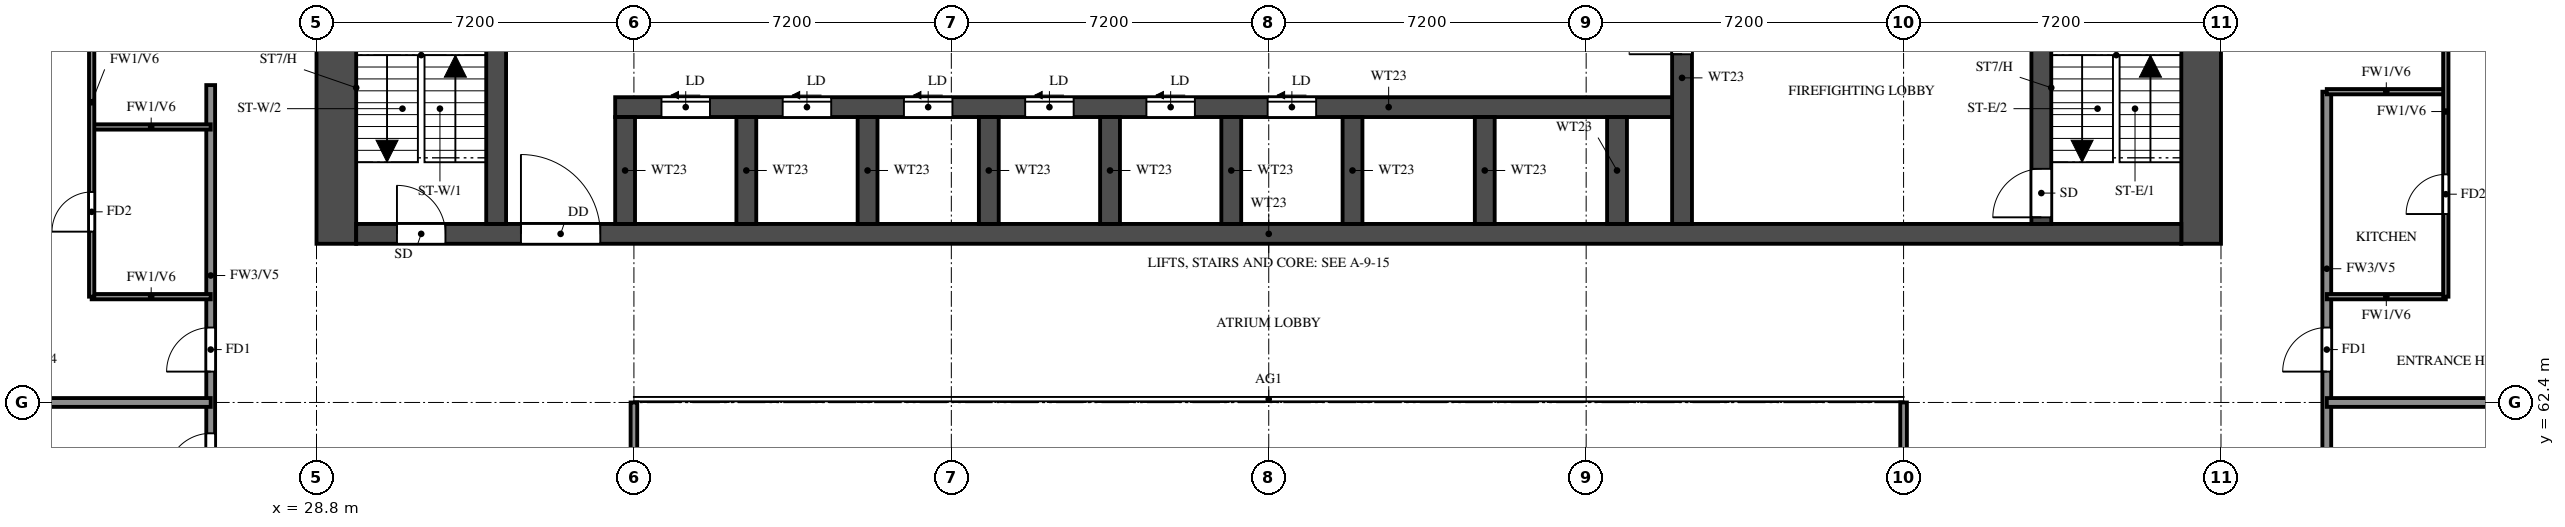
"""IFC4 building model, lengths in metres.
Left out: names, types, materials, properties, quantities, classifications, styles, units other than length and angle.
Written with IfcOpenShell. Run it as: python <this file> out.ifc"""

import sys

from ifc_helpers import new_model, si_unit, direction, frame, frame_2d, origin, place, context, subcontext, project, spatial, rectangle, extrude, element, fill, save


model = new_model("IFC4")
c1 = context("Model", 3, precision=1e-05, world=origin(), true_north=direction((0.0, 1.0)))
c2 = subcontext(c1, "Body", "Model", "MODEL_VIEW")
j1 = project(units=[si_unit("LENGTHUNIT", "METRE"), si_unit("PLANEANGLEUNIT", "RADIAN")], contexts=[c1])
p1 = place(None, origin())
s1 = spatial("IfcSite", under=j1, at=p1, CompositionType="ELEMENT")
p2 = place(p1, origin())
s2 = spatial("IfcBuilding", under=s1, at=p2, CompositionType="ELEMENT")
p3 = place(p2, frame((0.0, 0.0, 104.0)))
s3 = spatial("IfcBuildingStorey", under=s2, at=p3, CompositionType="ELEMENT", Elevation=104.0)
for number, where, z_axis, x_axis in (
    (1, (29.25, 66.0, 0.0), (0.0, 0.0, 1.0), (0.0, 1.0, 0.0)),
    (2, (71.55, 66.0, 0.0), (0.0, 0.0, 1.0), (0.0, 1.0, 0.0)),
):
    element("IfcWall", number, at=place(p3, frame(where, z_axis=z_axis, x_axis=x_axis)), inside=s3, PredefinedType="SHEAR", context=c2, shape_type="SweptSolid", body=[
        extrude(rectangle(XDim=12.0, YDim=0.9, at=frame_2d((6.0, 0.0))), origin(), (0.0, 0.0, 1.0), 3.1),
    ])
p4 = place(p3, frame((29.7, 66.225, 0.0), z_axis=(0.0, 0.0, 1.0), x_axis=(1.0, 0.0, 0.0)))
e3 = element("IfcWall", 3, at=p4, inside=s3, PredefinedType="SHEAR", context=c2, shape_type="SweptSolid", body=[
    extrude(rectangle(XDim=41.4, YDim=0.45, at=frame_2d((20.7, 0.0))), origin(), (0.0, 0.0, 1.0), 3.1),
])
p5 = place(p4, frame((0.925, 0.0, 0.0)))
e4 = element("IfcOpeningElement", 4, at=p5, cuts=e3, PredefinedType="OPENING", context=c2, shape_type="SweptSolid", body=[
    extrude(rectangle(XDim=1.1, YDim=2.1, at=frame_2d((0.55, 1.05))), frame((0.0, 0.235, 0.0), z_axis=(0.0, -1.0, 0.0), x_axis=(1.0, 0.0, 0.0)), (0.0, 0.0, 1.0), 0.47),
])
p6 = place(p4, frame((3.738, 0.0, 0.0)))
e5 = element("IfcOpeningElement", 5, at=p6, cuts=e3, PredefinedType="OPENING", context=c2, shape_type="SweptSolid", body=[
    extrude(rectangle(XDim=1.8, YDim=2.1, at=frame_2d((0.9, 1.05))), frame((0.0, 0.235, 0.0), z_axis=(0.0, -1.0, 0.0), x_axis=(1.0, 0.0, 0.0)), (0.0, 0.0, 1.0), 0.47),
])
p7 = place(p3, frame((35.575, 69.1, 0.0), z_axis=(0.0, 0.0, 1.0), x_axis=(1.0, 0.0, 0.0)))
e6 = element("IfcWall", 6, at=p7, inside=s3, PredefinedType="SHEAR", context=c2, shape_type="SweptSolid", body=[
    extrude(rectangle(XDim=24.2, YDim=0.45, at=frame_2d((12.1, 0.0))), origin(), (0.0, 0.0, 1.0), 3.1),
])
p8 = place(p7, frame((1.05, 0.0, 0.0)))
e7 = element("IfcOpeningElement", 7, at=p8, cuts=e6, PredefinedType="OPENING", context=c2, shape_type="SweptSolid", body=[
    extrude(rectangle(XDim=1.1, YDim=2.1, at=frame_2d((0.55, 1.05))), frame((0.0, 0.235, 0.0), z_axis=(0.0, -1.0, 0.0), x_axis=(1.0, 0.0, 0.0)), (0.0, 0.0, 1.0), 0.47),
])
p9 = place(p7, frame((3.8, 0.0, 0.0)))
e8 = element("IfcOpeningElement", 8, at=p9, cuts=e6, PredefinedType="OPENING", context=c2, shape_type="SweptSolid", body=[
    extrude(rectangle(XDim=1.1, YDim=2.1, at=frame_2d((0.55, 1.05))), frame((0.0, 0.235, 0.0), z_axis=(0.0, -1.0, 0.0), x_axis=(1.0, 0.0, 0.0)), (0.0, 0.0, 1.0), 0.47),
])
p10 = place(p7, frame((6.55, 0.0, 0.0)))
e9 = element("IfcOpeningElement", 9, at=p10, cuts=e6, PredefinedType="OPENING", context=c2, shape_type="SweptSolid", body=[
    extrude(rectangle(XDim=1.1, YDim=2.1, at=frame_2d((0.55, 1.05))), frame((0.0, 0.235, 0.0), z_axis=(0.0, -1.0, 0.0), x_axis=(1.0, 0.0, 0.0)), (0.0, 0.0, 1.0), 0.47),
])
p11 = place(p7, frame((9.3, 0.0, 0.0)))
e10 = element("IfcOpeningElement", 10, at=p11, cuts=e6, PredefinedType="OPENING", context=c2, shape_type="SweptSolid", body=[
    extrude(rectangle(XDim=1.1, YDim=2.1, at=frame_2d((0.55, 1.05))), frame((0.0, 0.235, 0.0), z_axis=(0.0, -1.0, 0.0), x_axis=(1.0, 0.0, 0.0)), (0.0, 0.0, 1.0), 0.47),
])
p12 = place(p7, frame((12.05, 0.0, 0.0)))
e11 = element("IfcOpeningElement", 11, at=p12, cuts=e6, PredefinedType="OPENING", context=c2, shape_type="SweptSolid", body=[
    extrude(rectangle(XDim=1.1, YDim=2.1, at=frame_2d((0.55, 1.05))), frame((0.0, 0.235, 0.0), z_axis=(0.0, -1.0, 0.0), x_axis=(1.0, 0.0, 0.0)), (0.0, 0.0, 1.0), 0.47),
])
p13 = place(p7, frame((14.8, 0.0, 0.0)))
e12 = element("IfcOpeningElement", 12, at=p13, cuts=e6, PredefinedType="OPENING", context=c2, shape_type="SweptSolid", body=[
    extrude(rectangle(XDim=1.1, YDim=2.1, at=frame_2d((0.55, 1.05))), frame((0.0, 0.235, 0.0), z_axis=(0.0, -1.0, 0.0), x_axis=(1.0, 0.0, 0.0)), (0.0, 0.0, 1.0), 0.47),
])
p14 = place(p3, frame((32.875, 66.45, 0.0), z_axis=(0.0, 0.0, 1.0), x_axis=(0.0, 1.0, 0.0)))
e13 = element("IfcWall", 13, at=p14, inside=s3, PredefinedType="SHEAR", context=c2, shape_type="SweptSolid", body=[
    extrude(rectangle(XDim=10.65, YDim=0.45, at=frame_2d((5.325, 0.0))), origin(), (0.0, 0.0, 1.0), 3.1),
])
p15 = place(p3, frame((67.925, 66.45, 0.0), z_axis=(0.0, 0.0, 1.0), x_axis=(0.0, 1.0, 0.0)))
e14 = element("IfcWall", 14, at=p15, inside=s3, PredefinedType="SHEAR", context=c2, shape_type="SweptSolid", body=[
    extrude(rectangle(XDim=10.65, YDim=0.45, at=frame_2d((5.325, 0.0))), origin(), (0.0, 0.0, 1.0), 3.1),
])
p16 = place(p15, frame((0.15, 0.0, 0.0)))
e15 = element("IfcOpeningElement", 15, at=p16, cuts=e14, PredefinedType="OPENING", context=c2, shape_type="SweptSolid", body=[
    extrude(rectangle(XDim=1.1, YDim=2.1, at=frame_2d((0.55, 1.05))), frame((0.0, 0.235, 0.0), z_axis=(0.0, -1.0, 0.0), x_axis=(1.0, 0.0, 0.0)), (0.0, 0.0, 1.0), 0.47),
])
p17 = place(p3, frame((59.775, 66.45, 0.0), z_axis=(0.0, 0.0, 1.0), x_axis=(0.0, 1.0, 0.0)))
e16 = element("IfcWall", 16, at=p17, inside=s3, PredefinedType="SHEAR", context=c2, shape_type="SweptSolid", body=[
    extrude(rectangle(XDim=6.025, YDim=0.45, at=frame_2d((3.013, 0.0))), origin(), (0.0, 0.0, 1.0), 3.1),
])
p18 = place(p17, frame((3.85, 0.0, 0.0)))
e17 = element("IfcOpeningElement", 17, at=p18, cuts=e16, PredefinedType="OPENING", context=c2, shape_type="SweptSolid", body=[
    extrude(rectangle(XDim=1.2, YDim=2.1, at=frame_2d((0.6, 1.05))), frame((0.0, 0.235, 0.0), z_axis=(0.0, -1.0, 0.0), x_axis=(1.0, 0.0, 0.0)), (0.0, 0.0, 1.0), 0.47),
])
for number, where, z_axis, x_axis in (
    (18, (35.8, 66.45, 0.0), (0.0, 0.0, 1.0), (0.0, 1.0, 0.0)),
    (19, (38.55, 66.45, 0.0), (0.0, 0.0, 1.0), (0.0, 1.0, 0.0)),
    (20, (41.3, 66.45, 0.0), (0.0, 0.0, 1.0), (0.0, 1.0, 0.0)),
    (21, (44.05, 66.45, 0.0), (0.0, 0.0, 1.0), (0.0, 1.0, 0.0)),
    (22, (46.8, 66.45, 0.0), (0.0, 0.0, 1.0), (0.0, 1.0, 0.0)),
    (23, (49.55, 66.45, 0.0), (0.0, 0.0, 1.0), (0.0, 1.0, 0.0)),
    (24, (52.3, 66.45, 0.0), (0.0, 0.0, 1.0), (0.0, 1.0, 0.0)),
    (25, (55.3, 66.45, 0.0), (0.0, 0.0, 1.0), (0.0, 1.0, 0.0)),
    (26, (58.3, 66.45, 0.0), (0.0, 0.0, 1.0), (0.0, 1.0, 0.0)),
):
    element("IfcWall", number, at=place(p3, frame(where, z_axis=z_axis, x_axis=x_axis)), inside=s3, PredefinedType="SHEAR", context=c2, shape_type="SweptSolid", body=[
        extrude(rectangle(XDim=2.425, YDim=0.45, at=frame_2d((1.212, 0.0))), origin(), (0.0, 0.0, 1.0), 3.1),
    ])
p19 = place(p3, frame((26.4, 60.0, 0.0), z_axis=(0.0, 0.0, 1.0), x_axis=(0.0, 1.0, 0.0)))
e27 = element("IfcWall", 27, at=p19, inside=s3, PredefinedType="SOLIDWALL", context=c2, shape_type="SweptSolid", body=[
    extrude(rectangle(XDim=9.6, YDim=0.2, at=frame_2d((4.8, 0.0))), origin(), (0.0, 0.0, 1.0), 3.1),
])
p20 = place(p19, frame((0.7, 0.0, 0.0)))
e28 = element("IfcOpeningElement", 28, at=p20, cuts=e27, PredefinedType="OPENING", context=c2, shape_type="SweptSolid", body=[
    extrude(rectangle(XDim=1.0, YDim=2.1, at=frame_2d((0.5, 1.05))), frame((0.0, 0.11, 0.0), z_axis=(0.0, -1.0, 0.0), x_axis=(1.0, 0.0, 0.0)), (0.0, 0.0, 1.0), 0.22),
])
p21 = place(p19, frame((3.1, 0.0, 0.0)))
e29 = element("IfcOpeningElement", 29, at=p21, cuts=e27, PredefinedType="OPENING", context=c2, shape_type="SweptSolid", body=[
    extrude(rectangle(XDim=1.0, YDim=2.1, at=frame_2d((0.5, 1.05))), frame((0.0, 0.11, 0.0), z_axis=(0.0, -1.0, 0.0), x_axis=(1.0, 0.0, 0.0)), (0.0, 0.0, 1.0), 0.22),
])
p22 = place(p3, frame((74.4, 60.0, 0.0), z_axis=(0.0, 0.0, 1.0), x_axis=(0.0, 1.0, 0.0)))
e30 = element("IfcWall", 30, at=p22, inside=s3, PredefinedType="SOLIDWALL", context=c2, shape_type="SweptSolid", body=[
    extrude(rectangle(XDim=9.45, YDim=0.2, at=frame_2d((4.725, 0.0))), origin(), (0.0, 0.0, 1.0), 3.1),
])
p23 = place(p22, frame((3.1, 0.0, 0.0)))
e31 = element("IfcOpeningElement", 31, at=p23, cuts=e30, PredefinedType="OPENING", context=c2, shape_type="SweptSolid", body=[
    extrude(rectangle(XDim=1.0, YDim=2.1, at=frame_2d((0.5, 1.05))), frame((0.0, 0.11, 0.0), z_axis=(0.0, -1.0, 0.0), x_axis=(1.0, 0.0, 0.0)), (0.0, 0.0, 1.0), 0.22),
])
for number, where, z_axis, x_axis in (
    (32, (14.525, 62.4, 0.0), (0.0, 0.0, 1.0), (1.0, 0.0, 0.0)),
    (33, (74.4, 62.4, 0.0), (0.0, 0.0, 1.0), (1.0, 0.0, 0.0)),
):
    element("IfcWall", number, at=place(p3, frame(where, z_axis=z_axis, x_axis=x_axis)), inside=s3, PredefinedType="SOLIDWALL", context=c2, shape_type="SweptSolid", body=[
        extrude(rectangle(XDim=11.875, YDim=0.2, at=frame_2d((5.938, 0.0))), origin(), (0.0, 0.0, 1.0), 3.1),
    ])
p24 = place(p3, frame((23.7, 64.8, 0.0), z_axis=(0.0, 0.0, 1.0), x_axis=(1.0, 0.0, 0.0)))
e34 = element("IfcWall", 34, at=p24, inside=s3, PredefinedType="PARTITIONING", context=c2, shape_type="SweptSolid", body=[
    extrude(rectangle(XDim=2.7, YDim=0.12, at=frame_2d((1.35, 0.0))), origin(), (0.0, 0.0, 1.0), 3.1),
])
p25 = place(p3, frame((74.4, 64.8, 0.0), z_axis=(0.0, 0.0, 1.0), x_axis=(1.0, 0.0, 0.0)))
e35 = element("IfcWall", 35, at=p25, inside=s3, PredefinedType="PARTITIONING", context=c2, shape_type="SweptSolid", body=[
    extrude(rectangle(XDim=2.7, YDim=0.12, at=frame_2d((1.35, 0.0))), origin(), (0.0, 0.0, 1.0), 3.1),
])
p26 = place(p3, frame((23.7, 68.65, 0.0), z_axis=(0.0, 0.0, 1.0), x_axis=(1.0, 0.0, 0.0)))
e36 = element("IfcWall", 36, at=p26, inside=s3, PredefinedType="PARTITIONING", context=c2, shape_type="SweptSolid", body=[
    extrude(rectangle(XDim=2.7, YDim=0.12, at=frame_2d((1.35, 0.0))), origin(), (0.0, 0.0, 1.0), 3.1),
])
p27 = place(p3, frame((74.4, 69.45, 0.0), z_axis=(0.0, 0.0, 1.0), x_axis=(1.0, 0.0, 0.0)))
e37 = element("IfcWall", 37, at=p27, inside=s3, PredefinedType="PARTITIONING", context=c2, shape_type="SweptSolid", body=[
    extrude(rectangle(XDim=2.7, YDim=0.12, at=frame_2d((1.35, 0.0))), origin(), (0.0, 0.0, 1.0), 3.1),
])
p28 = place(p3, frame((23.7, 64.8, 0.0), z_axis=(0.0, 0.0, 1.0), x_axis=(0.0, 1.0, 0.0)))
e38 = element("IfcWall", 38, at=p28, inside=s3, PredefinedType="PARTITIONING", context=c2, shape_type="SweptSolid", body=[
    extrude(rectangle(XDim=8.4, YDim=0.12, at=frame_2d((4.2, 0.0))), origin(), (0.0, 0.0, 1.0), 3.1),
])
p29 = place(p28, frame((1.475, 0.0, 0.0)))
e39 = element("IfcOpeningElement", 39, at=p29, cuts=e38, PredefinedType="OPENING", context=c2, shape_type="SweptSolid", body=[
    extrude(rectangle(XDim=0.9, YDim=2.1, at=frame_2d((0.45, 1.05))), frame((0.0, 0.07, 0.0), z_axis=(0.0, -1.0, 0.0), x_axis=(1.0, 0.0, 0.0)), (0.0, 0.0, 1.0), 0.14),
])
p30 = place(p28, frame((5.675, 0.0, 0.0)))
e40 = element("IfcOpeningElement", 40, at=p30, cuts=e38, PredefinedType="OPENING", context=c2, shape_type="SweptSolid", body=[
    extrude(rectangle(XDim=0.9, YDim=2.1, at=frame_2d((0.45, 1.05))), frame((0.0, 0.07, 0.0), z_axis=(0.0, -1.0, 0.0), x_axis=(1.0, 0.0, 0.0)), (0.0, 0.0, 1.0), 0.14),
])
p31 = place(p3, frame((77.1, 64.8, 0.0), z_axis=(0.0, 0.0, 1.0), x_axis=(0.0, 1.0, 0.0)))
e41 = element("IfcWall", 41, at=p31, inside=s3, PredefinedType="PARTITIONING", context=c2, shape_type="SweptSolid", body=[
    extrude(rectangle(XDim=8.4, YDim=0.12, at=frame_2d((4.2, 0.0))), origin(), (0.0, 0.0, 1.0), 3.1),
])
p32 = place(p31, frame((1.875, 0.0, 0.0)))
e42 = element("IfcOpeningElement", 42, at=p32, cuts=e41, PredefinedType="OPENING", context=c2, shape_type="SweptSolid", body=[
    extrude(rectangle(XDim=0.9, YDim=2.1, at=frame_2d((0.45, 1.05))), frame((0.0, 0.07, 0.0), z_axis=(0.0, -1.0, 0.0), x_axis=(1.0, 0.0, 0.0)), (0.0, 0.0, 1.0), 0.14),
])
p33 = place(p31, frame((6.075, 0.0, 0.0)))
e43 = element("IfcOpeningElement", 43, at=p33, cuts=e41, PredefinedType="OPENING", context=c2, shape_type="SweptSolid", body=[
    extrude(rectangle(XDim=0.9, YDim=2.1, at=frame_2d((0.45, 1.05))), frame((0.0, 0.07, 0.0), z_axis=(0.0, -1.0, 0.0), x_axis=(1.0, 0.0, 0.0)), (0.0, 0.0, 1.0), 0.14),
])
for number, where, z_axis, x_axis in (
    (44, (36.0, 48.0, 0.0), (0.0, 0.0, 1.0), (0.0, 1.0, 0.0)),
    (45, (64.8, 48.0, 0.0), (0.0, 0.0, 1.0), (0.0, 1.0, 0.0)),
):
    element("IfcWall", number, at=place(p3, frame(where, z_axis=z_axis, x_axis=x_axis)), inside=s3, PredefinedType="SOLIDWALL", context=c2, shape_type="SweptSolid", body=[
        extrude(rectangle(XDim=14.4, YDim=0.15, at=frame_2d((7.2, 0.0))), origin(), (0.0, 0.0, 1.0), 2.2),
    ])
p34 = place(p5, origin())
e46 = element("IfcDoor", 46, at=p34, inside=s3, OperationType="SINGLE_SWING_LEFT", PredefinedType="DOOR", context=c2, shape_type="SweptSolid", body=[
    extrude(rectangle(XDim=1.1, YDim=2.1, at=frame_2d((0.55, 1.05))), frame((0.0, 0.025, 0.0), z_axis=(0.0, -1.0, 0.0), x_axis=(1.0, 0.0, 0.0)), (0.0, 0.0, 1.0), 0.05),
])
fill(e4, e46)
p35 = place(p16, origin())
e47 = element("IfcDoor", 47, at=p35, inside=s3, OperationType="SINGLE_SWING_LEFT", PredefinedType="DOOR", context=c2, shape_type="SweptSolid", body=[
    extrude(rectangle(XDim=1.1, YDim=2.1, at=frame_2d((0.55, 1.05))), frame((0.0, 0.025, 0.0), z_axis=(0.0, -1.0, 0.0), x_axis=(1.0, 0.0, 0.0)), (0.0, 0.0, 1.0), 0.05),
])
fill(e15, e47)
p36 = place(p6, origin())
e48 = element("IfcDoor", 48, at=p36, inside=s3, OperationType="DOUBLE_DOOR_SINGLE_SWING", PredefinedType="DOOR", context=c2, shape_type="SweptSolid", body=[
    extrude(rectangle(XDim=1.8, YDim=2.1, at=frame_2d((0.9, 1.05))), frame((0.0, 0.025, 0.0), z_axis=(0.0, -1.0, 0.0), x_axis=(1.0, 0.0, 0.0)), (0.0, 0.0, 1.0), 0.05),
])
fill(e5, e48)
p37 = place(p18, origin())
e49 = element("IfcDoor", 49, at=p37, inside=s3, OperationType="SINGLE_SWING_RIGHT", PredefinedType="DOOR", context=c2, shape_type="SweptSolid", body=[
    extrude(rectangle(XDim=1.2, YDim=2.1, at=frame_2d((0.6, 1.05))), frame((0.0, 0.025, 0.0), z_axis=(0.0, -1.0, 0.0), x_axis=(1.0, 0.0, 0.0)), (0.0, 0.0, 1.0), 0.05),
])
fill(e17, e49)
p38 = place(p8, origin())
e50 = element("IfcDoor", 50, at=p38, inside=s3, OperationType="SLIDING_TO_LEFT", PredefinedType="DOOR", context=c2, shape_type="SweptSolid", body=[
    extrude(rectangle(XDim=1.1, YDim=2.1, at=frame_2d((0.55, 1.05))), frame((0.0, 0.025, 0.0), z_axis=(0.0, -1.0, 0.0), x_axis=(1.0, 0.0, 0.0)), (0.0, 0.0, 1.0), 0.05),
])
fill(e7, e50)
p39 = place(p9, origin())
e51 = element("IfcDoor", 51, at=p39, inside=s3, OperationType="SLIDING_TO_LEFT", PredefinedType="DOOR", context=c2, shape_type="SweptSolid", body=[
    extrude(rectangle(XDim=1.1, YDim=2.1, at=frame_2d((0.55, 1.05))), frame((0.0, 0.025, 0.0), z_axis=(0.0, -1.0, 0.0), x_axis=(1.0, 0.0, 0.0)), (0.0, 0.0, 1.0), 0.05),
])
fill(e8, e51)
p40 = place(p10, origin())
e52 = element("IfcDoor", 52, at=p40, inside=s3, OperationType="SLIDING_TO_LEFT", PredefinedType="DOOR", context=c2, shape_type="SweptSolid", body=[
    extrude(rectangle(XDim=1.1, YDim=2.1, at=frame_2d((0.55, 1.05))), frame((0.0, 0.025, 0.0), z_axis=(0.0, -1.0, 0.0), x_axis=(1.0, 0.0, 0.0)), (0.0, 0.0, 1.0), 0.05),
])
fill(e9, e52)
p41 = place(p11, origin())
e53 = element("IfcDoor", 53, at=p41, inside=s3, OperationType="SLIDING_TO_LEFT", PredefinedType="DOOR", context=c2, shape_type="SweptSolid", body=[
    extrude(rectangle(XDim=1.1, YDim=2.1, at=frame_2d((0.55, 1.05))), frame((0.0, 0.025, 0.0), z_axis=(0.0, -1.0, 0.0), x_axis=(1.0, 0.0, 0.0)), (0.0, 0.0, 1.0), 0.05),
])
fill(e10, e53)
p42 = place(p12, origin())
e54 = element("IfcDoor", 54, at=p42, inside=s3, OperationType="SLIDING_TO_LEFT", PredefinedType="DOOR", context=c2, shape_type="SweptSolid", body=[
    extrude(rectangle(XDim=1.1, YDim=2.1, at=frame_2d((0.55, 1.05))), frame((0.0, 0.025, 0.0), z_axis=(0.0, -1.0, 0.0), x_axis=(1.0, 0.0, 0.0)), (0.0, 0.0, 1.0), 0.05),
])
fill(e11, e54)
p43 = place(p13, origin())
e55 = element("IfcDoor", 55, at=p43, inside=s3, OperationType="SLIDING_TO_LEFT", PredefinedType="DOOR", context=c2, shape_type="SweptSolid", body=[
    extrude(rectangle(XDim=1.1, YDim=2.1, at=frame_2d((0.55, 1.05))), frame((0.0, 0.025, 0.0), z_axis=(0.0, -1.0, 0.0), x_axis=(1.0, 0.0, 0.0)), (0.0, 0.0, 1.0), 0.05),
])
fill(e12, e55)
p44 = place(p20, origin())
e56 = element("IfcDoor", 56, at=p44, inside=s3, OperationType="SINGLE_SWING_LEFT", PredefinedType="DOOR", context=c2, shape_type="SweptSolid", body=[
    extrude(rectangle(XDim=1.0, YDim=2.1, at=frame_2d((0.5, 1.05))), frame((0.0, 0.025, 0.0), z_axis=(0.0, -1.0, 0.0), x_axis=(1.0, 0.0, 0.0)), (0.0, 0.0, 1.0), 0.05),
])
fill(e28, e56)
p45 = place(p21, origin())
e57 = element("IfcDoor", 57, at=p45, inside=s3, OperationType="SINGLE_SWING_RIGHT", PredefinedType="DOOR", context=c2, shape_type="SweptSolid", body=[
    extrude(rectangle(XDim=1.0, YDim=2.1, at=frame_2d((0.5, 1.05))), frame((0.0, 0.025, 0.0), z_axis=(0.0, -1.0, 0.0), x_axis=(1.0, 0.0, 0.0)), (0.0, 0.0, 1.0), 0.05),
])
fill(e29, e57)
p46 = place(p29, origin())
e58 = element("IfcDoor", 58, at=p46, inside=s3, OperationType="SINGLE_SWING_LEFT", PredefinedType="DOOR", context=c2, shape_type="SweptSolid", body=[
    extrude(rectangle(XDim=0.9, YDim=2.1, at=frame_2d((0.45, 1.05))), frame((0.0, 0.025, 0.0), z_axis=(0.0, -1.0, 0.0), x_axis=(1.0, 0.0, 0.0)), (0.0, 0.0, 1.0), 0.05),
])
fill(e39, e58)
p47 = place(p23, origin())
e59 = element("IfcDoor", 59, at=p47, inside=s3, OperationType="SINGLE_SWING_LEFT", PredefinedType="DOOR", context=c2, shape_type="SweptSolid", body=[
    extrude(rectangle(XDim=1.0, YDim=2.1, at=frame_2d((0.5, 1.05))), frame((0.0, 0.025, 0.0), z_axis=(0.0, -1.0, 0.0), x_axis=(1.0, 0.0, 0.0)), (0.0, 0.0, 1.0), 0.05),
])
fill(e31, e59)
p48 = place(p32, origin())
e60 = element("IfcDoor", 60, at=p48, inside=s3, OperationType="SINGLE_SWING_RIGHT", PredefinedType="DOOR", context=c2, shape_type="SweptSolid", body=[
    extrude(rectangle(XDim=0.9, YDim=2.1, at=frame_2d((0.45, 1.05))), frame((0.0, 0.025, 0.0), z_axis=(0.0, -1.0, 0.0), x_axis=(1.0, 0.0, 0.0)), (0.0, 0.0, 1.0), 0.05),
])
fill(e42, e60)
save(model, sys.argv[1])
